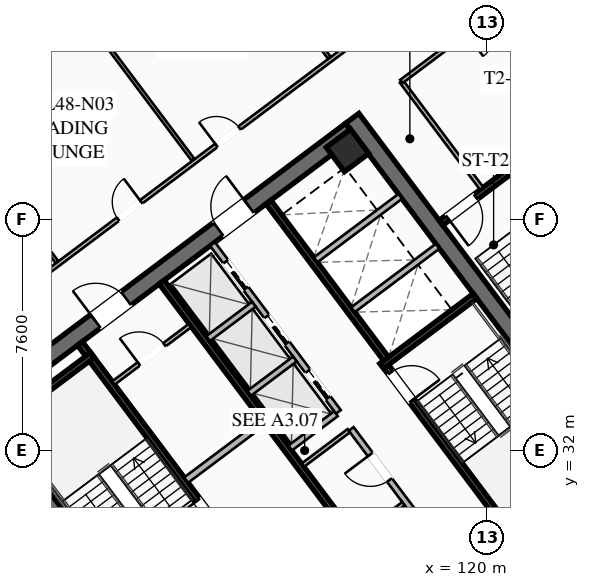
"""IFC4 building model, lengths in metres.
Left out: names, types, materials, properties, quantities, classifications, styles, units other than length and angle.
Written with IfcOpenShell. Run it as: python <this file> out.ifc"""

import sys

from ifc_helpers import new_model, si_unit, direction, frame, frame_2d, origin, origin_2d, place, context, subcontext, project, spatial, rectangle, hollow_rectangle, extrude, element, fill, save


model = new_model("IFC4")
c1 = context("Model", 3, precision=1e-05, world=origin(), true_north=direction((0.0, 1.0)))
c2 = subcontext(c1, "Body", "Model", "MODEL_VIEW")
j1 = project(units=[si_unit("LENGTHUNIT", "METRE"), si_unit("PLANEANGLEUNIT", "RADIAN")], contexts=[c1])
p1 = place(None, origin())
s1 = spatial("IfcSite", under=j1, at=p1, CompositionType="ELEMENT")
p2 = place(p1, origin())
s2 = spatial("IfcBuilding", under=s1, at=p2, CompositionType="ELEMENT")
p3 = place(p2, frame((0.0, 0.0, 178.3)))
s3 = spatial("IfcBuildingStorey", under=s2, at=p3, CompositionType="ELEMENT", Elevation=178.3)
for number, where, z_axis, x_axis in (
    (1, (112.436, 21.077, 0.0), (0.0, 0.0, 1.0), (-0.6, 0.8, 0.0)),
    (2, (115.564, 42.923, 0.0), (0.0, 0.0, 1.0), (0.6, -0.8, 0.0)),
):
    element("IfcWall", number, at=place(p3, frame(where, z_axis=z_axis, x_axis=x_axis)), inside=s3, PredefinedType="SHEAR", context=c2, shape_type="SweptSolid", body=[
        extrude(rectangle(XDim=15.6, YDim=0.55, at=frame_2d((7.8, 0.0))), origin(), (0.0, 0.0, 1.0), 3.55),
    ])
p4 = place(p3, frame((124.539, 30.498, 0.0), z_axis=(0.0, 0.0, 1.0), x_axis=(-0.799998054672, -0.600002593761, 0.0)))
e3 = element("IfcWall", 3, at=p4, inside=s3, PredefinedType="SHEAR", context=c2, shape_type="SweptSolid", body=[
    extrude(rectangle(XDim=15.06, YDim=0.55, at=frame_2d((7.53, 0.0))), origin(), (0.0, 0.0, 1.0), 3.55),
])
p5 = place(p4, frame((9.23, 0.0, 0.0)))
e4 = element("IfcOpeningElement", 4, at=p5, cuts=e3, PredefinedType="OPENING", context=c2, shape_type="SweptSolid", body=[
    extrude(rectangle(XDim=1.25, YDim=2.25, at=frame_2d((0.625, 1.125))), frame((0.0, 0.285, 0.0), z_axis=(0.0, -1.0, 0.0), x_axis=(1.0, 0.0, 0.0)), (0.0, 0.0, 1.0), 0.57),
])
p6 = place(p4, frame((4.18, 0.0, 0.0)))
e5 = element("IfcOpeningElement", 5, at=p6, cuts=e3, PredefinedType="OPENING", context=c2, shape_type="SweptSolid", body=[
    extrude(rectangle(XDim=1.25, YDim=2.25, at=frame_2d((0.625, 1.125))), frame((0.0, 0.285, 0.0), z_axis=(0.0, -1.0, 0.0), x_axis=(1.0, 0.0, 0.0)), (0.0, 0.0, 1.0), 0.57),
])
p7 = place(p3, frame((103.461, 33.502, 0.0), z_axis=(0.0, 0.0, 1.0), x_axis=(0.799998054672, 0.600002593761, 0.0)))
e6 = element("IfcWall", 6, at=p7, inside=s3, PredefinedType="SHEAR", context=c2, shape_type="SweptSolid", body=[
    extrude(rectangle(XDim=15.06, YDim=0.55, at=frame_2d((7.53, 0.0))), origin(), (0.0, 0.0, 1.0), 3.55),
])
p8 = place(p7, frame((4.58, 0.0, 0.0)))
e7 = element("IfcOpeningElement", 7, at=p8, cuts=e6, PredefinedType="OPENING", context=c2, shape_type="SweptSolid", body=[
    extrude(rectangle(XDim=1.25, YDim=2.25, at=frame_2d((0.625, 1.125))), frame((0.0, 0.285, 0.0), z_axis=(0.0, -1.0, 0.0), x_axis=(1.0, 0.0, 0.0)), (0.0, 0.0, 1.0), 0.57),
])
p9 = place(p7, frame((9.63, 0.0, 0.0)))
e8 = element("IfcOpeningElement", 8, at=p9, cuts=e6, PredefinedType="OPENING", context=c2, shape_type="SweptSolid", body=[
    extrude(rectangle(XDim=1.25, YDim=2.25, at=frame_2d((0.625, 1.125))), frame((0.0, 0.285, 0.0), z_axis=(0.0, -1.0, 0.0), x_axis=(1.0, 0.0, 0.0)), (0.0, 0.0, 1.0), 0.57),
])
p10 = place(p3, frame((115.41, 41.87, 0.0), z_axis=(0.0, 0.0, 1.0), x_axis=(0.799999996291, 0.600000004945, 0.0)))
e9 = element("IfcColumn", 9, at=p10, inside=s3, PredefinedType="COLUMN", context=c2, shape_type="SweptSolid", body=[
    extrude(hollow_rectangle(XDim=1.0, YDim=1.0, WallThickness=0.04, at=origin_2d()), origin(), (0.0, 0.0, 1.0), 3.37),
])
p11 = place(p3, frame((100.532, 42.874, 0.0), z_axis=(0.0, 0.0, 1.0), x_axis=(0.799996553335, 0.600004595526, 0.0)))
e10 = element("IfcWall", 10, at=p11, inside=s3, PredefinedType="SOLIDWALL", context=c2, shape_type="SweptSolid", body=[
    extrude(rectangle(XDim=8.5, YDim=0.28, at=frame_2d((4.25, 0.0))), origin(), (0.0, 0.0, 1.0), 3.37),
])
p12 = place(p11, frame((3.6, 0.0, 0.0)))
e11 = element("IfcOpeningElement", 11, at=p12, cuts=e10, PredefinedType="OPENING", context=c2, shape_type="SweptSolid", body=[
    extrude(rectangle(XDim=1.3, YDim=2.15, at=frame_2d((0.65, 1.075))), frame((0.0, 0.15, 0.0), z_axis=(0.0, -1.0, 0.0), x_axis=(1.0, 0.0, 0.0)), (0.0, 0.0, 1.0), 0.3),
])
p13 = place(p3, frame((111.44, 29.08, 0.0), z_axis=(0.0, 0.0, 1.0), x_axis=(-0.59999029481, 0.8000072788, 0.0)))
e12 = element("IfcWall", 12, at=p13, inside=s3, PredefinedType="SHEAR", context=c2, shape_type="SweptSolid", body=[
    extrude(rectangle(XDim=8.05, YDim=0.2, at=frame_2d((4.025, 0.0))), origin(), (0.0, 0.0, 1.0), 3.37),
])
p14 = place(p13, frame((0.45, 0.0, 0.0)))
e13 = element("IfcOpeningElement", 13, at=p14, cuts=e12, PredefinedType="OPENING", context=c2, shape_type="SweptSolid", body=[
    extrude(rectangle(XDim=1.15, YDim=2.2, at=frame_2d((0.575, 1.1))), frame((0.0, 0.11, 0.0), z_axis=(0.0, -1.0, 0.0), x_axis=(1.0, 0.0, 0.0)), (0.0, 0.0, 1.0), 0.22),
])
p15 = place(p3, frame((103.956, 32.842, 0.0), z_axis=(0.0, 0.0, 1.0), x_axis=(0.800015298837, 0.599979601008, 0.0)))
e14 = element("IfcWall", 14, at=p15, inside=s3, PredefinedType="SHEAR", context=c2, shape_type="SweptSolid", body=[
    extrude(rectangle(XDim=3.83, YDim=0.2, at=frame_2d((1.915, 0.0))), origin(), (0.0, 0.0, 1.0), 3.37),
])
p16 = place(p3, frame((116.56, 34.92, 0.0), z_axis=(0.0, 0.0, 1.0), x_axis=(0.59999029481, -0.8000072788, 0.0)))
e15 = element("IfcWall", 15, at=p16, inside=s3, PredefinedType="SHEAR", context=c2, shape_type="SweptSolid", body=[
    extrude(rectangle(XDim=8.05, YDim=0.2, at=frame_2d((4.025, 0.0))), origin(), (0.0, 0.0, 1.0), 3.37),
])
p17 = place(p16, frame((0.45, 0.0, 0.0)))
e16 = element("IfcOpeningElement", 16, at=p17, cuts=e15, PredefinedType="OPENING", context=c2, shape_type="SweptSolid", body=[
    extrude(rectangle(XDim=1.15, YDim=2.2, at=frame_2d((0.575, 1.1))), frame((0.0, 0.11, 0.0), z_axis=(0.0, -1.0, 0.0), x_axis=(1.0, 0.0, 0.0)), (0.0, 0.0, 1.0), 0.22),
])
p18 = place(p3, frame((116.54, 34.78, 0.0), z_axis=(0.0, 0.0, 1.0), x_axis=(0.800015298837, 0.599979601008, 0.0)))
e17 = element("IfcWall", 17, at=p18, inside=s3, PredefinedType="SHEAR", context=c2, shape_type="SweptSolid", body=[
    extrude(rectangle(XDim=3.83, YDim=0.2, at=frame_2d((1.915, 0.0))), origin(), (0.0, 0.0, 1.0), 3.37),
])
p19 = place(p3, frame((117.998, 25.936, 0.0), z_axis=(0.0, 0.0, 1.0), x_axis=(-0.600002693989, 0.799997979501, 0.0)))
e18 = element("IfcWall", 18, at=p19, inside=s3, PredefinedType="SHEAR", context=c2, shape_type="SweptSolid", body=[
    extrude(rectangle(XDim=14.5, YDim=0.2, at=frame_2d((7.25, 0.0))), origin(), (0.0, 0.0, 1.0), 3.37),
])
p20 = place(p3, frame((110.104, 31.028, 0.0), z_axis=(0.0, 0.0, 1.0), x_axis=(0.800018601094, 0.59997519774, 0.0)))
e19 = element("IfcWall", 19, at=p20, inside=s3, PredefinedType="SOLIDWALL", context=c2, shape_type="SweptSolid", body=[
    extrude(rectangle(XDim=3.15, YDim=0.22, at=frame_2d((1.575, 0.0))), origin(), (0.0, 0.0, 1.0), 2.723),
])
p21 = place(p3, frame((112.81, 40.17, 0.0), z_axis=(0.0, 0.0, 1.0), x_axis=(0.599993943644, -0.800004542231, 0.0)))
e20 = element("IfcWall", 20, at=p21, inside=s3, PredefinedType="SHEAR", context=c2, shape_type="SweptSolid", body=[
    extrude(rectangle(XDim=6.45, YDim=0.2, at=frame_2d((3.225, 0.0))), origin(), (0.0, 0.0, 1.0), 3.37),
])
for number, where, z_axis, x_axis in (
    (21, (115.59, 36.63, 0.0), (0.0, 0.0, 1.0), (0.8, 0.6, 0.0)),
    (22, (114.36, 38.27, 0.0), (0.0, 0.0, 1.0), (0.8, 0.6, 0.0)),
):
    element("IfcWall", number, at=place(p3, frame(where, z_axis=z_axis, x_axis=x_axis)), inside=s3, PredefinedType="SOLIDWALL", context=c2, shape_type="SweptSolid", body=[
        extrude(rectangle(XDim=3.48, YDim=0.2, at=frame_2d((1.74, 0.0))), origin(), (0.0, 0.0, 1.0), 3.37),
    ])
p22 = place(p3, frame((107.71, 34.22, 0.0), z_axis=(0.0, 0.0, 1.0), x_axis=(0.799981399002, 0.60002480053, 0.0)))
e23 = element("IfcWall", 23, at=p22, inside=s3, PredefinedType="PARTITIONING", context=c2, shape_type="SweptSolid", body=[
    extrude(rectangle(XDim=3.15, YDim=0.135, at=frame_2d((1.575, 0.0))), origin(), (0.0, 0.0, 1.0), 2.723),
])
p23 = place(p22, frame((1.05, 0.0, 0.0)))
e24 = element("IfcOpeningElement", 24, at=p23, cuts=e23, PredefinedType="OPENING", context=c2, shape_type="SweptSolid", body=[
    extrude(rectangle(XDim=1.05, YDim=2.2, at=frame_2d((0.525, 1.1))), frame((0.0, 0.077, 0.0), z_axis=(0.0, -1.0, 0.0), x_axis=(1.0, 0.0, 0.0)), (0.0, 0.0, 1.0), 0.155),
])
p24 = place(p3, frame((119.67, 27.19, 0.0), z_axis=(0.0, 0.0, 1.0), x_axis=(-0.599988677396, 0.800008491828, 0.0)))
e25 = element("IfcWall", 25, at=p24, inside=s3, PredefinedType="SOLIDWALL", context=c2, shape_type="SweptSolid", body=[
    extrude(rectangle(XDim=6.9, YDim=0.2, at=frame_2d((3.45, 0.0))), origin(), (0.0, 0.0, 1.0), 2.723),
])
p25 = place(p24, frame((0.85, 0.0, 0.0)))
e26 = element("IfcOpeningElement", 26, at=p25, cuts=e25, PredefinedType="OPENING", context=c2, shape_type="SweptSolid", body=[
    extrude(rectangle(XDim=0.95, YDim=2.05, at=frame_2d((0.475, 1.025))), frame((0.0, 0.11, 0.0), z_axis=(0.0, -1.0, 0.0), x_axis=(1.0, 0.0, 0.0)), (0.0, 0.0, 1.0), 0.22),
])
p26 = place(p24, frame((4.8, 0.0, 0.0)))
e27 = element("IfcOpeningElement", 27, at=p26, cuts=e25, PredefinedType="OPENING", context=c2, shape_type="SweptSolid", body=[
    extrude(rectangle(XDim=1.05, YDim=2.2, at=frame_2d((0.525, 1.1))), frame((0.0, 0.11, 0.0), z_axis=(0.0, -1.0, 0.0), x_axis=(1.0, 0.0, 0.0)), (0.0, 0.0, 1.0), 0.22),
])
for number, where, z_axis, x_axis in (
    (28, (113.946, 31.522, 0.0), (0.0, 0.0, 1.0), (0.8, 0.6, 0.0)),
    (29, (115.746, 29.122, 0.0), (0.0, 0.0, 1.0), (0.8, 0.6, 0.0)),
):
    element("IfcWall", number, at=place(p3, frame(where, z_axis=z_axis, x_axis=x_axis)), inside=s3, PredefinedType="PARTITIONING", context=c2, shape_type="SweptSolid", body=[
        extrude(rectangle(XDim=1.88, YDim=0.135, at=frame_2d((0.94, 0.0))), origin(), (0.0, 0.0, 1.0), 2.723),
    ])
p27 = place(p3, frame((115.11, 33.27, 0.0), z_axis=(0.0, 0.0, 1.0), x_axis=(-0.600011322243, 0.799991508192, 0.0)))
e30 = element("IfcWall", 30, at=p27, inside=s3, PredefinedType="SOLIDWALL", context=c2, shape_type="SweptSolid", body=[
    extrude(rectangle(XDim=6.9, YDim=0.2, at=frame_2d((3.45, 0.0))), origin(), (0.0, 0.0, 1.0), 3.37),
])
p28 = place(p27, frame((0.575, 0.0, 0.0)))
e31 = element("IfcOpeningElement", 31, at=p28, cuts=e30, PredefinedType="OPENING", context=c2, shape_type="SweptSolid", body=[
    extrude(rectangle(XDim=1.1, YDim=2.2, at=frame_2d((0.55, 1.1))), frame((0.0, 0.11, 0.0), z_axis=(0.0, -1.0, 0.0), x_axis=(1.0, 0.0, 0.0)), (0.0, 0.0, 1.0), 0.22),
])
p29 = place(p27, frame((2.825, 0.0, 0.0)))
e32 = element("IfcOpeningElement", 32, at=p29, cuts=e30, PredefinedType="OPENING", context=c2, shape_type="SweptSolid", body=[
    extrude(rectangle(XDim=1.1, YDim=2.2, at=frame_2d((0.55, 1.1))), frame((0.0, 0.11, 0.0), z_axis=(0.0, -1.0, 0.0), x_axis=(1.0, 0.0, 0.0)), (0.0, 0.0, 1.0), 0.22),
])
p30 = place(p27, frame((5.075, 0.0, 0.0)))
e33 = element("IfcOpeningElement", 33, at=p30, cuts=e30, PredefinedType="OPENING", context=c2, shape_type="SweptSolid", body=[
    extrude(rectangle(XDim=1.1, YDim=2.2, at=frame_2d((0.55, 1.1))), frame((0.0, 0.11, 0.0), z_axis=(0.0, -1.0, 0.0), x_axis=(1.0, 0.0, 0.0)), (0.0, 0.0, 1.0), 0.22),
])
p31 = place(p3, frame((113.526, 32.082, 0.0), z_axis=(0.0, 0.0, 1.0), x_axis=(0.800046745961, 0.599937666993, 0.0)))
e34 = element("IfcWall", 34, at=p31, inside=s3, PredefinedType="SOLIDWALL", context=c2, shape_type="SweptSolid", body=[
    extrude(rectangle(XDim=1.88, YDim=0.2, at=frame_2d((0.94, 0.0))), origin(), (0.0, 0.0, 1.0), 3.37),
])
p32 = place(p3, frame((112.176, 33.882, 0.0), z_axis=(0.0, 0.0, 1.0), x_axis=(0.8, 0.6, 0.0)))
e35 = element("IfcWall", 35, at=p32, inside=s3, PredefinedType="SOLIDWALL", context=c2, shape_type="SweptSolid", body=[
    extrude(rectangle(XDim=1.88, YDim=0.2, at=frame_2d((0.94, 0.0))), origin(), (0.0, 0.0, 1.0), 3.37),
])
p33 = place(p3, frame((110.826, 35.682, 0.0), z_axis=(0.0, 0.0, 1.0), x_axis=(0.799984418148, 0.600020775241, 0.0)))
e36 = element("IfcWall", 36, at=p33, inside=s3, PredefinedType="SOLIDWALL", context=c2, shape_type="SweptSolid", body=[
    extrude(rectangle(XDim=1.88, YDim=0.2, at=frame_2d((0.94, 0.0))), origin(), (0.0, 0.0, 1.0), 3.37),
])
p34 = place(p3, frame((121.204, 41.528, 0.0), z_axis=(0.0, 0.0, 1.0), x_axis=(-0.800017232136, -0.599977023131, 0.0)))
e37 = element("IfcWall", 37, at=p34, inside=s3, PredefinedType="SHEAR", context=c2, shape_type="SweptSolid", body=[
    extrude(rectangle(XDim=3.4, YDim=0.2, at=frame_2d((1.7, 0.0))), origin(), (0.0, 0.0, 1.0), 3.37),
])
p35 = place(p34, frame((1.975, 0.0, 0.0)))
e38 = element("IfcOpeningElement", 38, at=p35, cuts=e37, PredefinedType="OPENING", context=c2, shape_type="SweptSolid", body=[
    extrude(rectangle(XDim=1.15, YDim=2.2, at=frame_2d((0.575, 1.1))), frame((0.0, 0.11, 0.0), z_axis=(0.0, -1.0, 0.0), x_axis=(1.0, 0.0, 0.0)), (0.0, 0.0, 1.0), 0.22),
])
p36 = place(p3, frame((119.824, 40.618, 0.0), z_axis=(0.0, 0.0, 1.0), x_axis=(-0.599982243973, 0.800013316712, 0.0)))
e39 = element("IfcWall", 39, at=p36, inside=s3, PredefinedType="PARTITIONING", context=c2, shape_type="SweptSolid", body=[
    extrude(rectangle(XDim=4.4, YDim=0.135, at=frame_2d((2.2, 0.0))), origin(), (0.0, 0.0, 1.0), 2.723),
])
p37 = place(p3, frame((96.658, 31.206, 0.0), z_axis=(0.0, 0.0, 1.0), x_axis=(0.8, 0.6, 0.0)))
e40 = element("IfcWall", 40, at=p37, inside=s3, PredefinedType="PARTITIONING", context=c2, shape_type="SweptSolid", body=[
    extrude(rectangle(XDim=28.7, YDim=0.135, at=frame_2d((14.35, 0.0))), origin(), (0.0, 0.0, 1.0), 2.723),
])
p38 = place(p37, frame((0.3, 0.0, 0.0)))
e41 = element("IfcOpeningElement", 41, at=p38, cuts=e40, PredefinedType="OPENING", context=c2, shape_type="SweptSolid", body=[
    extrude(rectangle(XDim=0.95, YDim=2.05, at=frame_2d((0.475, 1.025))), frame((0.0, 0.077, 0.0), z_axis=(0.0, -1.0, 0.0), x_axis=(1.0, 0.0, 0.0)), (0.0, 0.0, 1.0), 0.155),
])
p39 = place(p37, frame((9.959, 0.0, 0.0)))
e42 = element("IfcOpeningElement", 42, at=p39, cuts=e40, PredefinedType="OPENING", context=c2, shape_type="SweptSolid", body=[
    extrude(rectangle(XDim=0.95, YDim=2.05, at=frame_2d((0.475, 1.025))), frame((0.0, 0.077, 0.0), z_axis=(0.0, -1.0, 0.0), x_axis=(1.0, 0.0, 0.0)), (0.0, 0.0, 1.0), 0.155),
])
p40 = place(p37, frame((14.005, 0.0, 0.0)))
e43 = element("IfcOpeningElement", 43, at=p40, cuts=e40, PredefinedType="OPENING", context=c2, shape_type="SweptSolid", body=[
    extrude(rectangle(XDim=0.95, YDim=2.05, at=frame_2d((0.475, 1.025))), frame((0.0, 0.077, 0.0), z_axis=(0.0, -1.0, 0.0), x_axis=(1.0, 0.0, 0.0)), (0.0, 0.0, 1.0), 0.155),
])
p41 = place(p37, frame((18.049, 0.0, 0.0)))
e44 = element("IfcOpeningElement", 44, at=p41, cuts=e40, PredefinedType="OPENING", context=c2, shape_type="SweptSolid", body=[
    extrude(rectangle(XDim=0.95, YDim=2.05, at=frame_2d((0.475, 1.025))), frame((0.0, 0.077, 0.0), z_axis=(0.0, -1.0, 0.0), x_axis=(1.0, 0.0, 0.0)), (0.0, 0.0, 1.0), 0.155),
])
p42 = place(p37, frame((27.45, 0.0, 0.0)))
e45 = element("IfcOpeningElement", 45, at=p42, cuts=e40, PredefinedType="OPENING", context=c2, shape_type="SweptSolid", body=[
    extrude(rectangle(XDim=0.95, YDim=2.05, at=frame_2d((0.475, 1.025))), frame((0.0, 0.077, 0.0), z_axis=(0.0, -1.0, 0.0), x_axis=(1.0, 0.0, 0.0)), (0.0, 0.0, 1.0), 0.155),
])
for number, where, z_axis, x_axis in (
    (46, (105.85, 38.2, 0.0), (0.0, 0.0, 1.0), (-0.6, 0.8, 0.0)),
    (47, (110.33, 41.56, 0.0), (0.0, 0.0, 1.0), (-0.6, 0.8, 0.0)),
    (48, (114.81, 44.92, 0.0), (0.0, 0.0, 1.0), (-0.6, 0.8, 0.0)),
):
    element("IfcWall", number, at=place(p3, frame(where, z_axis=z_axis, x_axis=x_axis)), inside=s3, PredefinedType="PARTITIONING", context=c2, shape_type="SweptSolid", body=[
        extrude(rectangle(XDim=6.78, YDim=0.11, at=frame_2d((3.39, 0.0))), origin(), (0.0, 0.0, 1.0), 2.723),
    ])
p43 = place(p3, frame((131.78, 32.21, 0.0), z_axis=(0.0, 0.0, 1.0), x_axis=(-0.8, -0.6, 0.0)))
e49 = element("IfcWall", 49, at=p43, inside=s3, PredefinedType="PARTITIONING", context=c2, shape_type="SweptSolid", body=[
    extrude(rectangle(XDim=28.7, YDim=0.135, at=frame_2d((14.35, 0.0))), origin(), (0.0, 0.0, 1.0), 2.723),
])
p44 = place(p43, frame((27.37, 0.0, 0.0)))
e50 = element("IfcOpeningElement", 50, at=p44, cuts=e49, PredefinedType="OPENING", context=c2, shape_type="SweptSolid", body=[
    extrude(rectangle(XDim=0.95, YDim=2.05, at=frame_2d((0.475, 1.025))), frame((0.0, 0.077, 0.0), z_axis=(0.0, -1.0, 0.0), x_axis=(1.0, 0.0, 0.0)), (0.0, 0.0, 1.0), 0.155),
])
p45 = place(p43, frame((13.592, 0.0, 0.0)))
e51 = element("IfcOpeningElement", 51, at=p45, cuts=e49, PredefinedType="OPENING", context=c2, shape_type="SweptSolid", body=[
    extrude(rectangle(XDim=0.95, YDim=2.05, at=frame_2d((0.475, 1.025))), frame((0.0, 0.077, 0.0), z_axis=(0.0, -1.0, 0.0), x_axis=(1.0, 0.0, 0.0)), (0.0, 0.0, 1.0), 0.155),
])
p46 = place(p43, frame((0.38, 0.0, 0.0)))
e52 = element("IfcOpeningElement", 52, at=p46, cuts=e49, PredefinedType="OPENING", context=c2, shape_type="SweptSolid", body=[
    extrude(rectangle(XDim=0.95, YDim=2.05, at=frame_2d((0.475, 1.025))), frame((0.0, 0.077, 0.0), z_axis=(0.0, -1.0, 0.0), x_axis=(1.0, 0.0, 0.0)), (0.0, 0.0, 1.0), 0.155),
])
p47 = place(p3, frame((122.744, 48.308, 0.0), z_axis=(0.0, 0.0, 1.0), x_axis=(-0.79997892247, -0.600028102345, 0.0)))
e53 = element("IfcWall", 53, at=p47, inside=s3, PredefinedType="PARTITIONING", context=c2, shape_type="SweptSolid", body=[
    extrude(rectangle(XDim=6.95, YDim=0.135, at=frame_2d((3.475, 0.0))), origin(), (0.0, 0.0, 1.0), 2.723),
])
p48 = place(p47, frame((3.35, 0.0, 0.0)))
e54 = element("IfcOpeningElement", 54, at=p48, cuts=e53, PredefinedType="OPENING", context=c2, shape_type="SweptSolid", body=[
    extrude(rectangle(XDim=0.95, YDim=2.05, at=frame_2d((0.475, 1.025))), frame((0.0, 0.077, 0.0), z_axis=(0.0, -1.0, 0.0), x_axis=(1.0, 0.0, 0.0)), (0.0, 0.0, 1.0), 0.155),
])
p49 = place(p3, frame((112.104, 20.928, 0.0), z_axis=(0.0, 0.0, 1.0), x_axis=(-0.599994940075, 0.800003794918, 0.0)))
e55 = element("IfcWall", 55, at=p49, inside=s3, PredefinedType="PARTITIONING", context=c2, shape_type="SweptSolid", body=[
    extrude(rectangle(XDim=15.44, YDim=0.135, at=frame_2d((7.72, 0.0))), origin(), (0.0, 0.0, 1.0), 2.723),
])
p50 = place(p8, origin())
e56 = element("IfcDoor", 56, at=p50, inside=s3, OperationType="SINGLE_SWING_LEFT", PredefinedType="DOOR", context=c2, shape_type="SweptSolid", body=[
    extrude(rectangle(XDim=1.25, YDim=2.25, at=frame_2d((0.625, 1.125))), frame((0.0, 0.025, 0.0), z_axis=(0.0, -1.0, 0.0), x_axis=(1.0, 0.0, 0.0)), (0.0, 0.0, 1.0), 0.05),
])
fill(e7, e56)
p51 = place(p9, origin())
e57 = element("IfcDoor", 57, at=p51, inside=s3, OperationType="SINGLE_SWING_RIGHT", PredefinedType="DOOR", context=c2, shape_type="SweptSolid", body=[
    extrude(rectangle(XDim=1.25, YDim=2.25, at=frame_2d((0.625, 1.125))), frame((0.0, 0.025, 0.0), z_axis=(0.0, -1.0, 0.0), x_axis=(1.0, 0.0, 0.0)), (0.0, 0.0, 1.0), 0.05),
])
fill(e8, e57)
p52 = place(p14, origin())
e58 = element("IfcDoor", 58, at=p52, inside=s3, OperationType="SINGLE_SWING_RIGHT", PredefinedType="DOOR", context=c2, shape_type="SweptSolid", body=[
    extrude(rectangle(XDim=1.15, YDim=2.2, at=frame_2d((0.575, 1.1))), frame((0.0, 0.025, 0.0), z_axis=(0.0, -1.0, 0.0), x_axis=(1.0, 0.0, 0.0)), (0.0, 0.0, 1.0), 0.05),
])
fill(e13, e58)
p53 = place(p17, origin())
e59 = element("IfcDoor", 59, at=p53, inside=s3, OperationType="SINGLE_SWING_RIGHT", PredefinedType="DOOR", context=c2, shape_type="SweptSolid", body=[
    extrude(rectangle(XDim=1.15, YDim=2.2, at=frame_2d((0.575, 1.1))), frame((0.0, 0.025, 0.0), z_axis=(0.0, -1.0, 0.0), x_axis=(1.0, 0.0, 0.0)), (0.0, 0.0, 1.0), 0.05),
])
fill(e16, e59)
p54 = place(p23, origin())
e60 = element("IfcDoor", 60, at=p54, inside=s3, OperationType="SINGLE_SWING_LEFT", PredefinedType="DOOR", context=c2, shape_type="SweptSolid", body=[
    extrude(rectangle(XDim=1.05, YDim=2.2, at=frame_2d((0.525, 1.1))), frame((0.0, 0.025, 0.0), z_axis=(0.0, -1.0, 0.0), x_axis=(1.0, 0.0, 0.0)), (0.0, 0.0, 1.0), 0.05),
])
fill(e24, e60)
p55 = place(p26, origin())
e61 = element("IfcDoor", 61, at=p55, inside=s3, OperationType="SINGLE_SWING_RIGHT", PredefinedType="DOOR", context=c2, shape_type="SweptSolid", body=[
    extrude(rectangle(XDim=1.05, YDim=2.2, at=frame_2d((0.525, 1.1))), frame((0.0, 0.025, 0.0), z_axis=(0.0, -1.0, 0.0), x_axis=(1.0, 0.0, 0.0)), (0.0, 0.0, 1.0), 0.05),
])
fill(e27, e61)
p56 = place(p35, origin())
e62 = element("IfcDoor", 62, at=p56, inside=s3, OperationType="SINGLE_SWING_RIGHT", PredefinedType="DOOR", context=c2, shape_type="SweptSolid", body=[
    extrude(rectangle(XDim=1.15, YDim=2.2, at=frame_2d((0.575, 1.1))), frame((0.0, 0.025, 0.0), z_axis=(0.0, -1.0, 0.0), x_axis=(1.0, 0.0, 0.0)), (0.0, 0.0, 1.0), 0.05),
])
fill(e38, e62)
p57 = place(p40, origin())
e63 = element("IfcDoor", 63, at=p57, inside=s3, OperationType="SINGLE_SWING_RIGHT", PredefinedType="DOOR", context=c2, shape_type="SweptSolid", body=[
    extrude(rectangle(XDim=0.95, YDim=2.05, at=frame_2d((0.475, 1.025))), frame((0.0, 0.025, 0.0), z_axis=(0.0, -1.0, 0.0), x_axis=(1.0, 0.0, 0.0)), (0.0, 0.0, 1.0), 0.05),
])
fill(e43, e63)
p58 = place(p41, origin())
e64 = element("IfcDoor", 64, at=p58, inside=s3, OperationType="SINGLE_SWING_LEFT", PredefinedType="DOOR", context=c2, shape_type="SweptSolid", body=[
    extrude(rectangle(XDim=0.95, YDim=2.05, at=frame_2d((0.475, 1.025))), frame((0.0, 0.025, 0.0), z_axis=(0.0, -1.0, 0.0), x_axis=(1.0, 0.0, 0.0)), (0.0, 0.0, 1.0), 0.05),
])
fill(e44, e64)
p59 = place(p28, origin())
e65 = element("IfcDoor", 65, at=p59, inside=s3, OperationType="SLIDING_TO_LEFT", PredefinedType="DOOR", context=c2, shape_type="SweptSolid", body=[
    extrude(rectangle(XDim=1.1, YDim=2.2, at=frame_2d((0.55, 1.1))), frame((0.0, 0.025, 0.0), z_axis=(0.0, -1.0, 0.0), x_axis=(1.0, 0.0, 0.0)), (0.0, 0.0, 1.0), 0.05),
])
fill(e31, e65)
p60 = place(p29, origin())
e66 = element("IfcDoor", 66, at=p60, inside=s3, OperationType="SLIDING_TO_LEFT", PredefinedType="DOOR", context=c2, shape_type="SweptSolid", body=[
    extrude(rectangle(XDim=1.1, YDim=2.2, at=frame_2d((0.55, 1.1))), frame((0.0, 0.025, 0.0), z_axis=(0.0, -1.0, 0.0), x_axis=(1.0, 0.0, 0.0)), (0.0, 0.0, 1.0), 0.05),
])
fill(e32, e66)
p61 = place(p30, origin())
e67 = element("IfcDoor", 67, at=p61, inside=s3, OperationType="SLIDING_TO_LEFT", PredefinedType="DOOR", context=c2, shape_type="SweptSolid", body=[
    extrude(rectangle(XDim=1.1, YDim=2.2, at=frame_2d((0.55, 1.1))), frame((0.0, 0.025, 0.0), z_axis=(0.0, -1.0, 0.0), x_axis=(1.0, 0.0, 0.0)), (0.0, 0.0, 1.0), 0.05),
])
fill(e33, e67)
save(model, sys.argv[1])
